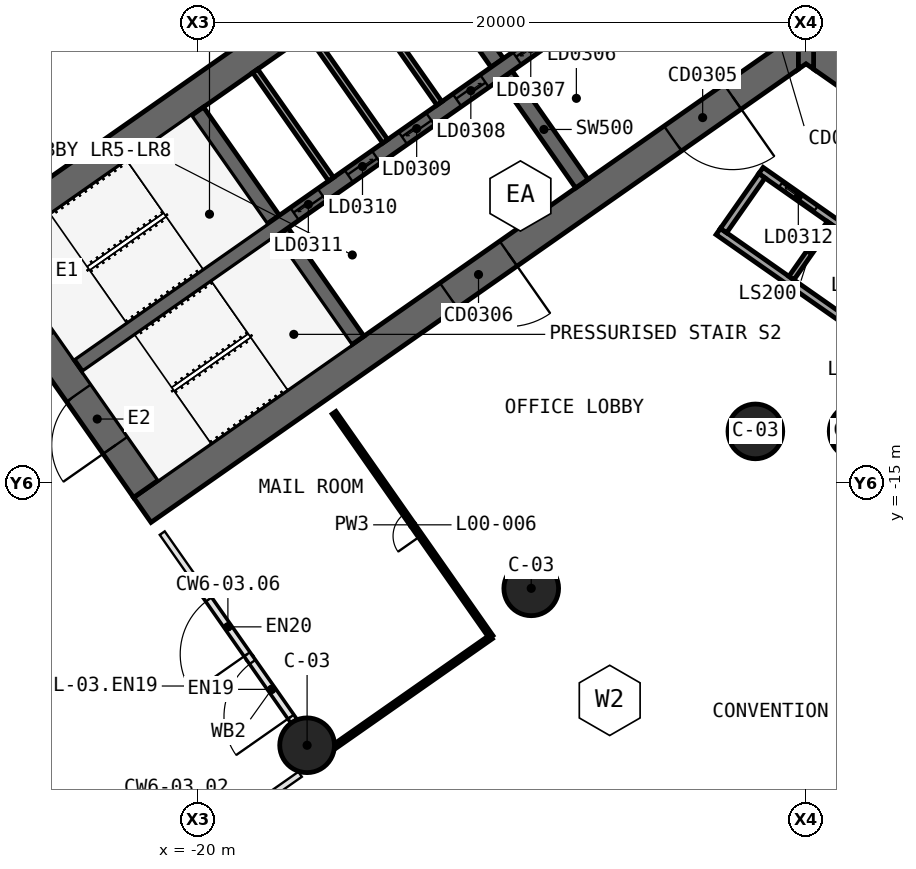
"""IFC4 building model, lengths in metres.
Left out: names, types, materials, properties, quantities, classifications, styles, units other than length and angle.
Written with IfcOpenShell. Run it as: python <this file> out.ifc"""

import sys

from ifc_helpers import new_model, si_unit, direction, frame, frame_2d, origin, origin_2d, place, context, subcontext, project, spatial, polyline, rectangle, circle, outline, extrude, element, fill, save


model = new_model("IFC4")
c1 = context("Model", 3, precision=1e-05, world=origin(), true_north=direction((0.0, 1.0)))
c2 = subcontext(c1, "Body", "Model", "MODEL_VIEW")
j1 = project(units=[si_unit("LENGTHUNIT", "METRE"), si_unit("PLANEANGLEUNIT", "RADIAN")], contexts=[c1])
p1 = place(None, origin())
s1 = spatial("IfcSite", under=j1, at=p1, CompositionType="ELEMENT")
p2 = place(p1, origin())
s2 = spatial("IfcBuilding", under=s1, at=p2, CompositionType="ELEMENT")
p3 = place(p2, origin())
s3 = spatial("IfcBuildingStorey", under=s2, at=p3, CompositionType="ELEMENT", Elevation=0.0)
p4 = place(p3, frame((0.037, 11.867, 0.0), z_axis=(0.0, 0.0, 1.0), x_axis=(-0.819155306259, -0.573571777746, 0.0)))
e1 = element("IfcWall", 1, at=p4, inside=s3, PredefinedType="SHEAR", context=c2, shape_type="SweptSolid", body=[
    extrude(outline(polyline([(33.837, 0.5), (0.7, 0.5), (0.0, -0.5), (33.837, -0.5), (33.837, 0.5)])), origin(), (0.0, 0.0, 1.0), 9.0),
])
p5 = place(p3, frame((0.037, -0.585, 0.0), z_axis=(0.0, 0.0, 1.0), x_axis=(-0.819157152511, -0.573569140985, 0.0)))
e2 = element("IfcWall", 2, at=p5, inside=s3, PredefinedType="SHEAR", context=c2, shape_type="SweptSolid", body=[
    extrude(outline(polyline([(26.695, 0.5), (0.7, 0.5), (0.0, -0.5), (26.695, -0.5), (26.695, 0.5)])), origin(), (0.0, 0.0, 1.0), 9.0),
])
p6 = place(p5, frame((2.995, 0.0, 0.0)))
e3 = element("IfcOpeningElement", 3, at=p6, cuts=e2, PredefinedType="OPENING", context=c2, shape_type="SweptSolid", body=[
    extrude(rectangle(XDim=2.4, YDim=2.1, at=frame_2d((1.2, 1.05))), frame((0.0, 0.51, 0.0), z_axis=(0.0, -1.0, 0.0), x_axis=(1.0, 0.0, 0.0)), (0.0, 0.0, 1.0), 1.02),
])
p7 = place(p5, frame((11.995, 0.0, 0.0)))
e4 = element("IfcOpeningElement", 4, at=p7, cuts=e2, PredefinedType="OPENING", context=c2, shape_type="SweptSolid", body=[
    extrude(rectangle(XDim=2.4, YDim=2.1, at=frame_2d((1.2, 1.05))), frame((0.0, 0.51, 0.0), z_axis=(0.0, -1.0, 0.0), x_axis=(1.0, 0.0, 0.0)), (0.0, 0.0, 1.0), 1.02),
])
p8 = place(p3, frame((-21.708, -15.2, 0.0), z_axis=(0.0, 0.0, 1.0), x_axis=(-0.573576324356, 0.819152122709, 0.0)))
e5 = element("IfcWall", 5, at=p8, inside=s3, PredefinedType="SHEAR", context=c2, shape_type="SweptSolid", body=[
    extrude(outline(polyline([(0.0, 0.5), (0.0, -0.5), (9.2, -0.5), (9.2, 0.5), (0.0, 0.5)])), origin(), (0.0, 0.0, 1.0), 9.0),
])
p9 = place(p8, frame((5.95, 0.0, 0.0)))
e6 = element("IfcOpeningElement", 6, at=p9, cuts=e5, PredefinedType="OPENING", context=c2, shape_type="SweptSolid", body=[
    extrude(rectangle(XDim=2.1, YDim=2.1, at=frame_2d((1.05, 1.05))), frame((0.0, 0.51, 0.0), z_axis=(0.0, -1.0, 0.0), x_axis=(1.0, 0.0, 0.0)), (0.0, 0.0, 1.0), 1.02),
])
p10 = place(p8, frame((1.75, 0.0, 0.0)))
e7 = element("IfcOpeningElement", 7, at=p10, cuts=e5, PredefinedType="OPENING", context=c2, shape_type="SweptSolid", body=[
    extrude(rectangle(XDim=2.1, YDim=2.1, at=frame_2d((1.05, 1.05))), frame((0.0, 0.51, 0.0), z_axis=(0.0, -1.0, 0.0), x_axis=(1.0, 0.0, 0.0)), (0.0, 0.0, 1.0), 1.02),
])
p11 = place(p3, frame((-7.372, -5.162, 0.0), z_axis=(0.0, 0.0, 1.0), x_axis=(-0.573594173421, 0.819139624372, 0.0)))
e8 = element("IfcWall", 8, at=p11, inside=s3, PredefinedType="SHEAR", context=c2, shape_type="SweptSolid", body=[
    extrude(outline(polyline([(4.35, 0.25), (0.0, 0.25), (0.0, -0.25), (4.35, -0.25), (4.35, 0.25)])), origin(), (0.0, 0.0, 1.0), 9.0),
])
p12 = place(p3, frame((-10.154, -1.189, 0.0), z_axis=(0.0, 0.0, 1.0), x_axis=(-0.573594173421, 0.819139624372, 0.0)))
e9 = element("IfcWall", 9, at=p12, inside=s3, PredefinedType="SHEAR", context=c2, shape_type="SweptSolid", body=[
    extrude(outline(polyline([(4.35, -0.25), (4.35, 0.25), (-0.0, 0.25), (-0.0, -0.25), (4.35, -0.25)])), origin(), (0.0, 0.0, 1.0), 9.0),
])
p13 = place(p3, frame((-14.745, -10.324, 0.0), z_axis=(0.0, 0.0, 1.0), x_axis=(-0.57356780395, 0.819158088694, 0.0)))
e10 = element("IfcWall", 10, at=p13, inside=s3, PredefinedType="SHEAR", context=c2, shape_type="SweptSolid", body=[
    extrude(outline(polyline([(4.35, 0.25), (0.0, 0.25), (0.0, -0.25), (4.35, -0.25), (4.35, 0.25)])), origin(), (0.0, 0.0, 1.0), 9.0),
])
p14 = place(p3, frame((-17.527, -6.352, 0.0), z_axis=(0.0, 0.0, 1.0), x_axis=(-0.573530143085, 0.819184457233, 0.0)))
e11 = element("IfcWall", 11, at=p14, inside=s3, PredefinedType="SHEAR", context=c2, shape_type="SweptSolid", body=[
    extrude(outline(polyline([(4.35, -0.25), (4.35, 0.25), (0.0, 0.25), (0.0, -0.25), (4.35, -0.25)])), origin(), (0.0, 0.0, 1.0), 9.0),
])
p15 = place(p3, frame((-2.638, 3.768, 0.0), z_axis=(0.0, 0.0, 1.0), x_axis=(-0.819148977158, -0.573580816643, 0.0)))
e12 = element("IfcWall", 12, at=p15, inside=s3, PredefinedType="SHEAR", context=c2, shape_type="SweptSolid", body=[
    extrude(outline(polyline([(26.0, 0.25), (0.0, 0.25), (0.0, -0.25), (26.0, -0.25), (26.0, 0.25)])), origin(), (0.0, 0.0, 1.0), 9.0),
])
p16 = place(p15, frame((1.169, 0.0, 0.0)))
e13 = element("IfcOpeningElement", 13, at=p16, cuts=e12, PredefinedType="OPENING", context=c2, shape_type="SweptSolid", body=[
    extrude(rectangle(XDim=1.1, YDim=2.1, at=frame_2d((0.55, 1.05))), frame((0.0, 0.26, 0.0), z_axis=(0.0, -1.0, 0.0), x_axis=(1.0, 0.0, 0.0)), (0.0, 0.0, 1.0), 0.52),
])
p17 = place(p15, frame((3.206, 0.0, 0.0)))
e14 = element("IfcOpeningElement", 14, at=p17, cuts=e12, PredefinedType="OPENING", context=c2, shape_type="SweptSolid", body=[
    extrude(rectangle(XDim=1.1, YDim=2.1, at=frame_2d((0.55, 1.05))), frame((0.0, 0.26, 0.0), z_axis=(0.0, -1.0, 0.0), x_axis=(1.0, 0.0, 0.0)), (0.0, 0.0, 1.0), 0.52),
])
p18 = place(p15, frame((5.244, 0.0, 0.0)))
e15 = element("IfcOpeningElement", 15, at=p18, cuts=e12, PredefinedType="OPENING", context=c2, shape_type="SweptSolid", body=[
    extrude(rectangle(XDim=1.1, YDim=2.1, at=frame_2d((0.55, 1.05))), frame((0.0, 0.26, 0.0), z_axis=(0.0, -1.0, 0.0), x_axis=(1.0, 0.0, 0.0)), (0.0, 0.0, 1.0), 0.52),
])
p19 = place(p15, frame((7.281, 0.0, 0.0)))
e16 = element("IfcOpeningElement", 16, at=p19, cuts=e12, PredefinedType="OPENING", context=c2, shape_type="SweptSolid", body=[
    extrude(rectangle(XDim=1.1, YDim=2.1, at=frame_2d((0.55, 1.05))), frame((0.0, 0.26, 0.0), z_axis=(0.0, -1.0, 0.0), x_axis=(1.0, 0.0, 0.0)), (0.0, 0.0, 1.0), 0.52),
])
p20 = place(p15, frame((9.688, 0.0, 0.0)))
e17 = element("IfcOpeningElement", 17, at=p20, cuts=e12, PredefinedType="OPENING", context=c2, shape_type="SweptSolid", body=[
    extrude(rectangle(XDim=1.1, YDim=2.1, at=frame_2d((0.55, 1.05))), frame((0.0, 0.26, 0.0), z_axis=(0.0, -1.0, 0.0), x_axis=(1.0, 0.0, 0.0)), (0.0, 0.0, 1.0), 0.52),
])
p21 = place(p15, frame((11.863, 0.0, 0.0)))
e18 = element("IfcOpeningElement", 18, at=p21, cuts=e12, PredefinedType="OPENING", context=c2, shape_type="SweptSolid", body=[
    extrude(rectangle(XDim=1.1, YDim=2.1, at=frame_2d((0.55, 1.05))), frame((0.0, 0.26, 0.0), z_axis=(0.0, -1.0, 0.0), x_axis=(1.0, 0.0, 0.0)), (0.0, 0.0, 1.0), 0.52),
])
p22 = place(p15, frame((14.038, 0.0, 0.0)))
e19 = element("IfcOpeningElement", 19, at=p22, cuts=e12, PredefinedType="OPENING", context=c2, shape_type="SweptSolid", body=[
    extrude(rectangle(XDim=1.1, YDim=2.1, at=frame_2d((0.55, 1.05))), frame((0.0, 0.26, 0.0), z_axis=(0.0, -1.0, 0.0), x_axis=(1.0, 0.0, 0.0)), (0.0, 0.0, 1.0), 0.52),
])
p23 = place(p15, frame((16.212, 0.0, 0.0)))
e20 = element("IfcOpeningElement", 20, at=p23, cuts=e12, PredefinedType="OPENING", context=c2, shape_type="SweptSolid", body=[
    extrude(rectangle(XDim=1.1, YDim=2.1, at=frame_2d((0.55, 1.05))), frame((0.0, 0.26, 0.0), z_axis=(0.0, -1.0, 0.0), x_axis=(1.0, 0.0, 0.0)), (0.0, 0.0, 1.0), 0.52),
])
p24 = place(p3, frame((-0.037, 11.867, 0.0), z_axis=(0.0, 0.0, 1.0), x_axis=(0.819155306259, -0.573571777746, 0.0)))
e21 = element("IfcWall", 21, at=p24, inside=s3, PredefinedType="SHEAR", context=c2, shape_type="SweptSolid", body=[
    extrude(outline(polyline([(33.837, 0.5), (0.0, 0.5), (0.7, -0.5), (33.837, -0.5), (33.837, 0.5)])), origin(), (0.0, 0.0, 1.0), 9.0),
])
p25 = place(p24, frame((4.287, 0.0, 0.0)))
e22 = element("IfcOpeningElement", 22, at=p25, cuts=e21, PredefinedType="OPENING", context=c2, shape_type="SweptSolid", body=[
    extrude(rectangle(XDim=1.1, YDim=2.1, at=frame_2d((0.55, 1.05))), frame((0.0, 0.51, 0.0), z_axis=(0.0, -1.0, 0.0), x_axis=(1.0, 0.0, 0.0)), (0.0, 0.0, 1.0), 1.02),
])
p26 = place(p3, frame((-0.037, -0.585, 0.0), z_axis=(0.0, 0.0, 1.0), x_axis=(0.819157152511, -0.573569140985, 0.0)))
e23 = element("IfcWall", 23, at=p26, inside=s3, PredefinedType="SHEAR", context=c2, shape_type="SweptSolid", body=[
    extrude(outline(polyline([(26.695, 0.5), (0.0, 0.5), (0.7, -0.5), (26.695, -0.5), (26.695, 0.5)])), origin(), (0.0, 0.0, 1.0), 9.0),
])
p27 = place(p26, frame((2.995, 0.0, 0.0)))
e24 = element("IfcOpeningElement", 24, at=p27, cuts=e23, PredefinedType="OPENING", context=c2, shape_type="SweptSolid", body=[
    extrude(rectangle(XDim=2.4, YDim=2.1, at=frame_2d((1.2, 1.05))), frame((0.0, 0.51, 0.0), z_axis=(0.0, -1.0, 0.0), x_axis=(1.0, 0.0, 0.0)), (0.0, 0.0, 1.0), 1.02),
])
p28 = place(p26, frame((12.445, 0.0, 0.0)))
e25 = element("IfcOpeningElement", 25, at=p28, cuts=e23, PredefinedType="OPENING", context=c2, shape_type="SweptSolid", body=[
    extrude(rectangle(XDim=1.5, YDim=2.1, at=frame_2d((0.75, 1.05))), frame((0.0, 0.51, 0.0), z_axis=(0.0, -1.0, 0.0), x_axis=(1.0, 0.0, 0.0)), (0.0, 0.0, 1.0), 1.02),
])
p29 = place(p3, frame((0.0, -1.396, 0.0), z_axis=(0.0, 0.0, 1.0), x_axis=(0.0, 1.0, 0.0)))
e26 = element("IfcWall", 26, at=p29, inside=s3, PredefinedType="SHEAR", context=c2, shape_type="SweptSolid", body=[
    extrude(outline(polyline([(0.0, -0.25), (0.175, -0.25), (1.221, -0.25), (12.452, -0.25), (13.848, -0.25), (13.857, -0.25), (13.968, -0.172), (13.848, 0.0), (13.968, 0.172), (13.857, 0.25), (13.848, 0.25), (12.452, 0.25), (1.221, 0.25), (0.175, 0.25), (0.0, 0.25), (0.175, 0.0), (0.0, -0.25)])), origin(), (0.0, 0.0, 1.0), 9.0),
])
for number, where, z_axis, x_axis in (
    (27, (-1.665, -13.313, 0.0), (0.0, 0.0, 1.0), (-0.819, -0.574, 0.0)),
    (28, (-9.038, -18.475, 0.0), (0.0, 0.0, 1.0), (-0.819, -0.574, 0.0)),
    (29, (-16.41, -23.637, 0.0), (0.0, 0.0, 1.0), (-0.819, -0.574, 0.0)),
    (30, (1.665, -13.313, 0.0), (0.0, 0.0, 1.0), (0.819, -0.574, 0.0)),
):
    element("IfcColumn", number, at=place(p3, frame(where, z_axis=z_axis, x_axis=x_axis)), inside=s3, PredefinedType="COLUMN", context=c2, shape_type="SweptSolid", body=[
        extrude(circle(Radius=0.9, at=origin_2d()), origin(), (0.0, 0.0, 1.0), 9.0),
    ])
p30 = place(p3, frame((-12.059, -2.523, 0.0), z_axis=(0.0, 0.0, 1.0), x_axis=(-0.573594173421, 0.819139624372, 0.0)))
e31 = element("IfcWall", 31, at=p30, inside=s3, PredefinedType="SOLIDWALL", context=c2, shape_type="SweptSolid", body=[
    extrude(rectangle(XDim=4.35, YDim=0.2, at=frame_2d((2.175, 0.0))), origin(), (0.0, 0.0, 1.0), 9.0),
])
p31 = place(p3, frame((-13.84, -3.771, 0.0), z_axis=(0.0, 0.0, 1.0), x_axis=(-0.57356780395, 0.819158088694, 0.0)))
e32 = element("IfcWall", 32, at=p31, inside=s3, PredefinedType="SOLIDWALL", context=c2, shape_type="SweptSolid", body=[
    extrude(rectangle(XDim=4.35, YDim=0.2, at=frame_2d((2.175, 0.0))), origin(), (0.0, 0.0, 1.0), 9.0),
])
p32 = place(p3, frame((-15.622, -5.018, 0.0), z_axis=(0.0, 0.0, 1.0), x_axis=(-0.573594173421, 0.819139624372, 0.0)))
e33 = element("IfcWall", 33, at=p32, inside=s3, PredefinedType="SOLIDWALL", context=c2, shape_type="SweptSolid", body=[
    extrude(rectangle(XDim=4.35, YDim=0.2, at=frame_2d((2.175, 0.0))), origin(), (0.0, 0.0, 1.0), 9.0),
])
p33 = place(p3, frame((-2.887, -6.738, 0.0), z_axis=(0.0, 0.0, 1.0), x_axis=(0.819150280716, -0.573578954985, 0.0)))
e34 = element("IfcWall", 34, at=p33, inside=s3, PredefinedType="SOLIDWALL", context=c2, shape_type="SweptSolid", body=[
    extrude(rectangle(XDim=11.1, YDim=0.25, at=frame_2d((5.55, 0.0))), origin(), (0.0, 0.0, 1.0), 9.0),
])
p34 = place(p3, frame((-1.481, -4.731, 0.0), z_axis=(0.0, 0.0, 1.0), x_axis=(0.819150280716, -0.573578954985, 0.0)))
e35 = element("IfcWall", 35, at=p34, inside=s3, PredefinedType="SOLIDWALL", context=c2, shape_type="SweptSolid", body=[
    extrude(rectangle(XDim=11.1, YDim=0.25, at=frame_2d((5.55, 0.0))), origin(), (0.0, 0.0, 1.0), 9.0),
])
p35 = place(p34, frame((0.8, 0.0, 0.0)))
e36 = element("IfcOpeningElement", 36, at=p35, cuts=e35, PredefinedType="OPENING", context=c2, shape_type="SweptSolid", body=[
    extrude(rectangle(XDim=1.4, YDim=2.1, at=frame_2d((0.7, 1.05))), frame((0.0, 0.135, 0.0), z_axis=(0.0, -1.0, 0.0), x_axis=(1.0, 0.0, 0.0)), (0.0, 0.0, 1.0), 0.27),
])
p36 = place(p34, frame((3.5, 0.0, 0.0)))
e37 = element("IfcOpeningElement", 37, at=p36, cuts=e35, PredefinedType="OPENING", context=c2, shape_type="SweptSolid", body=[
    extrude(rectangle(XDim=1.4, YDim=2.1, at=frame_2d((0.7, 1.05))), frame((0.0, 0.135, 0.0), z_axis=(0.0, -1.0, 0.0), x_axis=(1.0, 0.0, 0.0)), (0.0, 0.0, 1.0), 0.27),
])
p37 = place(p34, frame((6.2, 0.0, 0.0)))
e38 = element("IfcOpeningElement", 38, at=p37, cuts=e35, PredefinedType="OPENING", context=c2, shape_type="SweptSolid", body=[
    extrude(rectangle(XDim=1.4, YDim=2.1, at=frame_2d((0.7, 1.05))), frame((0.0, 0.135, 0.0), z_axis=(0.0, -1.0, 0.0), x_axis=(1.0, 0.0, 0.0)), (0.0, 0.0, 1.0), 0.27),
])
p38 = place(p34, frame((8.9, 0.0, 0.0)))
e39 = element("IfcOpeningElement", 39, at=p38, cuts=e35, PredefinedType="OPENING", context=c2, shape_type="SweptSolid", body=[
    extrude(rectangle(XDim=1.4, YDim=2.1, at=frame_2d((0.7, 1.05))), frame((0.0, 0.135, 0.0), z_axis=(0.0, -1.0, 0.0), x_axis=(1.0, 0.0, 0.0)), (0.0, 0.0, 1.0), 0.27),
])
p39 = place(p3, frame((-2.713, -6.707, 0.0), z_axis=(0.0, 0.0, 1.0), x_axis=(0.573581496053, 0.819148501424, 0.0)))
e40 = element("IfcWall", 40, at=p39, inside=s3, PredefinedType="SOLIDWALL", context=c2, shape_type="SweptSolid", body=[
    extrude(rectangle(XDim=2.2, YDim=0.25, at=frame_2d((1.1, 0.0))), origin(), (0.0, 0.0, 1.0), 9.0),
])
p40 = place(p3, frame((-0.48, -8.27, 0.0), z_axis=(0.0, 0.0, 1.0), x_axis=(0.573633636671, 0.819111989218, 0.0)))
e41 = element("IfcWall", 41, at=p40, inside=s3, PredefinedType="SOLIDWALL", context=c2, shape_type="SweptSolid", body=[
    extrude(rectangle(XDim=2.2, YDim=0.2, at=frame_2d((1.1, 0.0))), origin(), (0.0, 0.0, 1.0), 9.0),
])
p41 = place(p3, frame((-16.873, -22.802, 0.0), z_axis=(0.0, 0.0, 1.0), x_axis=(-0.573616137927, 0.819124243512, 0.0)))
e42 = element("IfcWall", 42, at=p41, inside=s3, PredefinedType="SOLIDWALL", context=c2, shape_type="SweptSolid", body=[
    extrude(rectangle(XDim=2.45, YDim=0.2, at=frame_2d((1.225, 0.0))), origin(), (0.0, 0.0, 1.0), 2.7),
])
p42 = place(p41, frame((0.125, 0.0, 0.0)))
e43 = element("IfcOpeningElement", 43, at=p42, cuts=e42, PredefinedType="OPENING", context=c2, shape_type="SweptSolid", body=[
    extrude(rectangle(XDim=2.2, YDim=2.4, at=frame_2d((1.1, 1.2))), frame((0.0, 0.11, 0.0), z_axis=(0.0, -1.0, 0.0), x_axis=(1.0, 0.0, 0.0)), (0.0, 0.0, 1.0), 0.22),
])
p43 = place(p3, frame((-18.312, -20.746, 0.0), z_axis=(0.0, 0.0, 1.0), x_axis=(-0.573549278612, 0.819171059672, 0.0)))
e44 = element("IfcWall", 44, at=p43, inside=s3, PredefinedType="SOLIDWALL", context=c2, shape_type="SweptSolid", body=[
    extrude(rectangle(XDim=2.45, YDim=0.2, at=frame_2d((1.225, 0.0))), origin(), (0.0, 0.0, 1.0), 2.7),
])
p44 = place(p43, frame((0.125, 0.0, 0.0)))
e45 = element("IfcOpeningElement", 45, at=p44, cuts=e44, PredefinedType="OPENING", context=c2, shape_type="SweptSolid", body=[
    extrude(rectangle(XDim=2.2, YDim=2.4, at=frame_2d((1.1, 1.2))), frame((0.0, 0.11, 0.0), z_axis=(0.0, -1.0, 0.0), x_axis=(1.0, 0.0, 0.0)), (0.0, 0.0, 1.0), 0.22),
])
p45 = place(p3, frame((-15.492, -23.666, 0.0), z_axis=(0.0, 0.0, 1.0), x_axis=(0.819155033433, 0.573572167388, 0.0)))
e46 = element("IfcWall", 46, at=p45, inside=s3, PredefinedType="PARTITIONING", context=c2, shape_type="SweptSolid", body=[
    extrude(rectangle(XDim=6.266, YDim=0.15, at=frame_2d((3.133, 0.0))), origin(), (0.0, 0.0, 1.0), 8.6),
])
p46 = place(p3, frame((-10.36, -20.072, 0.0), z_axis=(0.0, 0.0, 1.0), x_axis=(-0.573591598124, 0.819141427692, 0.0)))
e47 = element("IfcWall", 47, at=p46, inside=s3, PredefinedType="PARTITIONING", context=c2, shape_type="SweptSolid", body=[
    extrude(rectangle(XDim=9.0, YDim=0.15, at=frame_2d((4.5, 0.0))), origin(), (0.0, 0.0, 1.0), 7.38),
])
p47 = place(p46, frame((4.05, 0.0, 0.0)))
e48 = element("IfcOpeningElement", 48, at=p47, cuts=e47, PredefinedType="OPENING", context=c2, shape_type="SweptSolid", body=[
    extrude(rectangle(XDim=0.9, YDim=2.1, at=frame_2d((0.45, 1.05))), frame((0.0, 0.085, 0.0), z_axis=(0.0, -1.0, 0.0), x_axis=(1.0, 0.0, 0.0)), (0.0, 0.0, 1.0), 0.17),
])
p48 = place(p19, origin())
e49 = element("IfcDoor", 49, at=p48, inside=s3, OperationType="SLIDING_TO_RIGHT", PredefinedType="DOOR", context=c2, shape_type="SweptSolid", body=[
    extrude(rectangle(XDim=1.1, YDim=2.1, at=frame_2d((0.55, 1.05))), frame((0.0, 0.025, 0.0), z_axis=(0.0, -1.0, 0.0), x_axis=(1.0, 0.0, 0.0)), (0.0, 0.0, 1.0), 0.05),
])
fill(e16, e49)
p49 = place(p20, origin())
e50 = element("IfcDoor", 50, at=p49, inside=s3, OperationType="SLIDING_TO_LEFT", PredefinedType="DOOR", context=c2, shape_type="SweptSolid", body=[
    extrude(rectangle(XDim=1.1, YDim=2.1, at=frame_2d((0.55, 1.05))), frame((0.0, 0.025, 0.0), z_axis=(0.0, -1.0, 0.0), x_axis=(1.0, 0.0, 0.0)), (0.0, 0.0, 1.0), 0.05),
])
fill(e17, e50)
p50 = place(p21, origin())
e51 = element("IfcDoor", 51, at=p50, inside=s3, OperationType="SLIDING_TO_RIGHT", PredefinedType="DOOR", context=c2, shape_type="SweptSolid", body=[
    extrude(rectangle(XDim=1.1, YDim=2.1, at=frame_2d((0.55, 1.05))), frame((0.0, 0.025, 0.0), z_axis=(0.0, -1.0, 0.0), x_axis=(1.0, 0.0, 0.0)), (0.0, 0.0, 1.0), 0.05),
])
fill(e18, e51)
p51 = place(p22, origin())
e52 = element("IfcDoor", 52, at=p51, inside=s3, OperationType="SLIDING_TO_LEFT", PredefinedType="DOOR", context=c2, shape_type="SweptSolid", body=[
    extrude(rectangle(XDim=1.1, YDim=2.1, at=frame_2d((0.55, 1.05))), frame((0.0, 0.025, 0.0), z_axis=(0.0, -1.0, 0.0), x_axis=(1.0, 0.0, 0.0)), (0.0, 0.0, 1.0), 0.05),
])
fill(e19, e52)
p52 = place(p23, origin())
e53 = element("IfcDoor", 53, at=p52, inside=s3, OperationType="SLIDING_TO_RIGHT", PredefinedType="DOOR", context=c2, shape_type="SweptSolid", body=[
    extrude(rectangle(XDim=1.1, YDim=2.1, at=frame_2d((0.55, 1.05))), frame((0.0, 0.025, 0.0), z_axis=(0.0, -1.0, 0.0), x_axis=(1.0, 0.0, 0.0)), (0.0, 0.0, 1.0), 0.05),
])
fill(e20, e53)
p53 = place(p6, origin())
e54 = element("IfcDoor", 54, at=p53, inside=s3, OperationType="DOUBLE_DOOR_SINGLE_SWING", PredefinedType="DOOR", context=c2, shape_type="SweptSolid", body=[
    extrude(rectangle(XDim=2.4, YDim=2.1, at=frame_2d((1.2, 1.05))), frame((0.0, 0.025, 0.0), z_axis=(0.0, -1.0, 0.0), x_axis=(1.0, 0.0, 0.0)), (0.0, 0.0, 1.0), 0.05),
])
fill(e3, e54)
p54 = place(p7, origin())
e55 = element("IfcDoor", 55, at=p54, inside=s3, OperationType="DOUBLE_DOOR_SINGLE_SWING", PredefinedType="DOOR", context=c2, shape_type="SweptSolid", body=[
    extrude(rectangle(XDim=2.4, YDim=2.1, at=frame_2d((1.2, 1.05))), frame((0.0, 0.025, 0.0), z_axis=(0.0, -1.0, 0.0), x_axis=(1.0, 0.0, 0.0)), (0.0, 0.0, 1.0), 0.05),
])
fill(e4, e55)
p55 = place(p10, origin())
e56 = element("IfcDoor", 56, at=p55, inside=s3, OperationType="DOUBLE_DOOR_SINGLE_SWING", PredefinedType="DOOR", context=c2, shape_type="SweptSolid", body=[
    extrude(rectangle(XDim=2.1, YDim=2.1, at=frame_2d((1.05, 1.05))), frame((0.0, 0.025, 0.0), z_axis=(0.0, -1.0, 0.0), x_axis=(1.0, 0.0, 0.0)), (0.0, 0.0, 1.0), 0.05),
])
fill(e7, e56)
p56 = place(p35, origin())
e57 = element("IfcDoor", 57, at=p56, inside=s3, OperationType="SLIDING_TO_LEFT", PredefinedType="DOOR", context=c2, shape_type="SweptSolid", body=[
    extrude(rectangle(XDim=1.4, YDim=2.1, at=frame_2d((0.7, 1.05))), frame((0.0, 0.025, 0.0), z_axis=(0.0, -1.0, 0.0), x_axis=(1.0, 0.0, 0.0)), (0.0, 0.0, 1.0), 0.05),
])
fill(e36, e57)
p57 = place(p42, origin())
e58 = element("IfcDoor", 58, at=p57, inside=s3, OperationType="DOUBLE_DOOR_DOUBLE_SWING", PredefinedType="DOOR", context=c2, shape_type="SweptSolid", body=[
    extrude(rectangle(XDim=2.2, YDim=2.4, at=frame_2d((1.1, 1.2))), frame((0.0, 0.025, 0.0), z_axis=(0.0, -1.0, 0.0), x_axis=(1.0, 0.0, 0.0)), (0.0, 0.0, 1.0), 0.05),
])
fill(e43, e58)
p58 = place(p44, origin())
e59 = element("IfcDoor", 59, at=p58, inside=s3, OperationType="DOUBLE_DOOR_DOUBLE_SWING", PredefinedType="DOOR", context=c2, shape_type="SweptSolid", body=[
    extrude(rectangle(XDim=2.2, YDim=2.4, at=frame_2d((1.1, 1.2))), frame((0.0, 0.025, 0.0), z_axis=(0.0, -1.0, 0.0), x_axis=(1.0, 0.0, 0.0)), (0.0, 0.0, 1.0), 0.05),
])
fill(e45, e59)
p59 = place(p47, origin())
e60 = element("IfcDoor", 60, at=p59, inside=s3, OperationType="SINGLE_SWING_LEFT", PredefinedType="DOOR", context=c2, shape_type="SweptSolid", body=[
    extrude(rectangle(XDim=0.9, YDim=2.1, at=frame_2d((0.45, 1.05))), frame((0.0, 0.025, 0.0), z_axis=(0.0, -1.0, 0.0), x_axis=(1.0, 0.0, 0.0)), (0.0, 0.0, 1.0), 0.05),
])
fill(e48, e60)
save(model, sys.argv[1])
